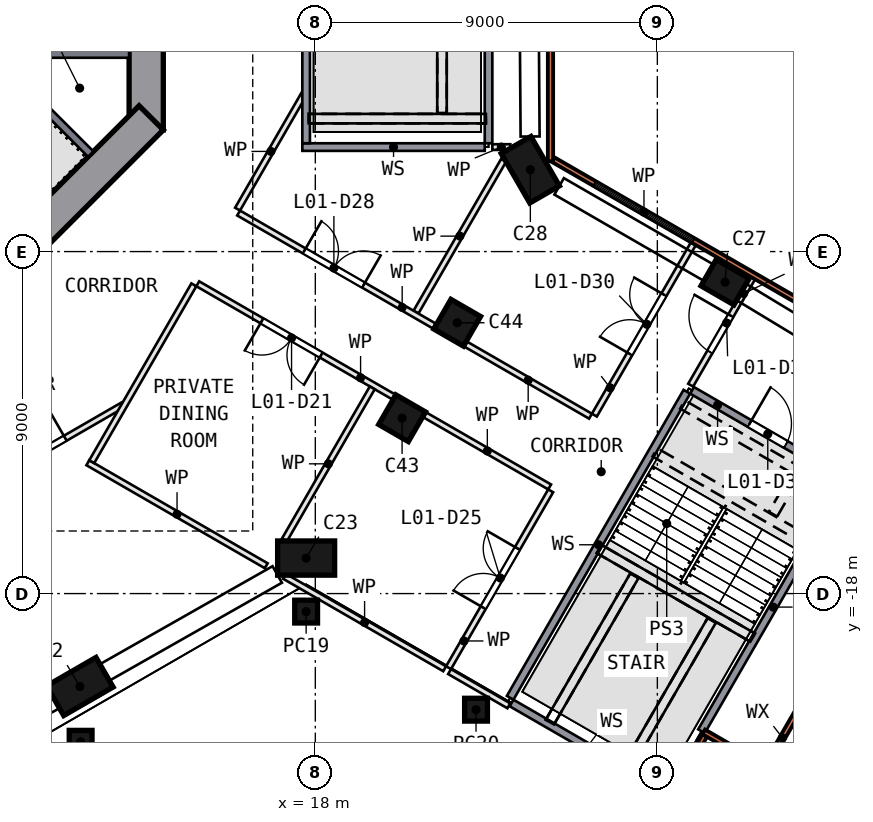
"""IFC4 building model, lengths in metres.
Left out: names, types, materials, properties, quantities, classifications, styles, units other than length and angle.
Written with IfcOpenShell. Run it as: python <this file> out.ifc"""

import sys

from ifc_helpers import new_model, si_unit, direction, frame, frame_2d, origin, origin_2d, place, context, subcontext, project, spatial, polyline, rectangle, outline, extrude, element, fill, save


model = new_model("IFC4")
c1 = context("Model", 3, precision=1e-05, world=origin(), true_north=direction((0.0, 1.0)))
c2 = subcontext(c1, "Body", "Model", "MODEL_VIEW")
j1 = project(units=[si_unit("LENGTHUNIT", "METRE"), si_unit("PLANEANGLEUNIT", "RADIAN")], contexts=[c1])
p1 = place(None, origin())
s1 = spatial("IfcSite", under=j1, at=p1, CompositionType="ELEMENT")
p2 = place(p1, origin())
s2 = spatial("IfcBuilding", under=s1, at=p2, CompositionType="ELEMENT")
p3 = place(p2, frame((0.0, 0.0, 8.0)))
s3 = spatial("IfcBuildingStorey", under=s2, at=p3, CompositionType="ELEMENT", Elevation=8.0)
for number, where, z_axis, x_axis in (
    (1, (11.804, -20.445, 0.0), (0.0, 0.0, 1.0), (0.866, 0.5, 0.0)),
    (2, (17.758, -17.065, 0.0), (0.0, 0.0, 1.0), (-1.0, 0.0, 0.0)),
):
    element("IfcColumn", number, at=place(p3, frame(where, z_axis=z_axis, x_axis=x_axis)), inside=s3, PredefinedType="COLUMN", context=c2, shape_type="SweptSolid", body=[
        extrude(rectangle(XDim=1.5, YDim=0.9, at=origin_2d()), origin(), (0.0, 0.0, 1.0), 5.55),
    ])
p4 = place(p3, frame((28.783, -9.805, 0.0), z_axis=(0.0, 0.0, 1.0), x_axis=(-0.866025404, 0.5, 0.0)))
e3 = element("IfcColumn", 3, at=p4, inside=s3, PredefinedType="COLUMN", context=c2, shape_type="SweptSolid", body=[
    extrude(rectangle(XDim=1.0, YDim=0.8, at=origin_2d()), origin(), (0.0, 0.0, 1.0), 5.55),
])
p5 = place(p3, frame((23.658, -6.846, 0.0), z_axis=(0.0, 0.0, 1.0), x_axis=(0.5, -0.866025404, 0.0)))
e4 = element("IfcColumn", 4, at=p5, inside=s3, PredefinedType="COLUMN", context=c2, shape_type="SweptSolid", body=[
    extrude(rectangle(XDim=1.5, YDim=0.9, at=origin_2d()), origin(), (0.0, 0.0, 1.0), 5.55),
])
for number, where, z_axis, x_axis in (
    (5, (20.283, -13.385, 0.0), (0.0, 0.0, 1.0), (0.866, -0.5, 0.0)),
    (6, (21.733, -10.873, 0.0), (0.0, 0.0, 1.0), (0.866, -0.5, 0.0)),
):
    element("IfcColumn", number, at=place(p3, frame(where, z_axis=z_axis, x_axis=x_axis)), inside=s3, PredefinedType="COLUMN", context=c2, shape_type="SweptSolid", body=[
        extrude(rectangle(XDim=0.9, YDim=0.9, at=origin_2d()), origin(), (0.0, 0.0, 1.0), 5.55),
    ])
p6 = place(p3, frame((13.55, -5.799, 0.0), z_axis=(0.0, 0.0, 1.0), x_axis=(0.0, 1.0, 0.0)))
e7 = element("IfcWall", 7, at=p6, inside=s3, PredefinedType="SHEAR", context=c2, shape_type="SweptSolid", body=[
    extrude(rectangle(XDim=11.598, YDim=0.9, at=frame_2d((5.799, 0.0))), origin(), (0.0, 0.0, 1.0), 6.0),
])
p7 = place(p6, frame((4.899, 0.0, 0.0)))
e8 = element("IfcOpeningElement", 8, at=p7, cuts=e7, PredefinedType="OPENING", context=c2, shape_type="SweptSolid", body=[
    extrude(rectangle(XDim=1.8, YDim=2.1, at=frame_2d((0.9, 1.05))), frame((0.0, 0.46, 0.0), z_axis=(0.0, -1.0, 0.0), x_axis=(1.0, 0.0, 0.0)), (0.0, 0.0, 1.0), 0.92),
])
p8 = place(p3, frame((5.481, -13.682, 0.0), z_axis=(0.0, 0.0, 1.0), x_axis=(0.707106781, 0.707106781, 0.0)))
e9 = element("IfcWall", 9, at=p8, inside=s3, PredefinedType="SHEAR", context=c2, shape_type="SweptSolid", body=[
    extrude(rectangle(XDim=11.598, YDim=0.9, at=frame_2d((5.799, 0.0))), origin(), (0.0, 0.0, 1.0), 6.0),
])
p9 = place(p8, frame((2.099, 0.0, 0.0)))
e10 = element("IfcOpeningElement", 10, at=p9, cuts=e9, PredefinedType="OPENING", context=c2, shape_type="SweptSolid", body=[
    extrude(rectangle(XDim=1.2, YDim=2.1, at=frame_2d((0.6, 1.05))), frame((0.0, 0.46, 0.0), z_axis=(0.0, -1.0, 0.0), x_axis=(1.0, 0.0, 0.0)), (0.0, 0.0, 1.0), 0.92),
])
for number, where, z_axis, x_axis in (
    (11, (11.825, -21.9, 0.0), (0.0, 0.0, 1.0), (0.0, -1.0, 0.0)),
    (12, (17.758, -18.474, 0.0), (0.0, 0.0, 1.0), (0.0, -1.0, 0.0)),
    (13, (22.229, -21.055, 0.0), (0.0, 0.0, 1.0), (0.0, -1.0, 0.0)),
):
    element("IfcColumn", number, at=place(p3, frame(where, z_axis=z_axis, x_axis=x_axis)), inside=s3, PredefinedType="COLUMN", context=c2, shape_type="SweptSolid", body=[
        extrude(rectangle(XDim=0.6, YDim=0.6, at=origin_2d()), origin(), (0.0, 0.0, 1.0), 6.0),
    ])
p10 = place(p3, frame((27.051, -23.807, 0.0), z_axis=(0.0, 0.0, 1.0), x_axis=(0.499969813, 0.866042832, 0.0)))
e14 = element("IfcWall", 14, at=p10, inside=s3, PredefinedType="SOLIDWALL", context=c2, shape_type="SweptSolid", body=[
    extrude(rectangle(XDim=2.392, YDim=0.14, at=frame_2d((1.196, 0.0))), origin(), (0.0, 0.0, 1.0), 5.55),
])
p11 = place(p3, frame((28.221, -21.64, 0.0), z_axis=(0.0, 0.0, 1.0), x_axis=(0.866011627, -0.500023862, 0.0)))
e15 = element("IfcWall", 15, at=p11, inside=s3, PredefinedType="SOLIDWALL", context=c2, shape_type="SweptSolid", body=[
    extrude(rectangle(XDim=1.94, YDim=0.14, at=frame_2d((0.97, 0.0))), origin(), (0.0, 0.0, 1.0), 5.55),
])
p12 = place(p3, frame((29.875, -22.514, 0.0), z_axis=(0.0, 0.0, 1.0), x_axis=(0.499998264, 0.866026406, 0.0)))
e16 = element("IfcWall", 16, at=p12, inside=s3, PredefinedType="SOLIDWALL", context=c2, shape_type="SweptSolid", body=[
    extrude(rectangle(XDim=1.66, YDim=0.14, at=frame_2d((0.83, 0.0))), origin(), (0.0, 0.0, 1.0), 5.55),
])
p13 = place(p3, frame((33.751, -12.062, 0.0), z_axis=(0.0, 0.0, 1.0), x_axis=(-0.86602647, 0.499998154, 0.0)))
e17 = element("IfcWall", 17, at=p13, inside=s3, PredefinedType="SOLIDWALL", context=c2, shape_type="SweptSolid", body=[
    extrude(rectangle(XDim=10.961, YDim=0.14, at=frame_2d((5.481, 0.0))), origin(), (0.0, 0.0, 1.0), 5.55),
])
p14 = place(p13, frame((6.702, 0.0, 0.9)))
e18 = element("IfcOpeningElement", 18, at=p14, cuts=e17, PredefinedType="OPENING", context=c2, shape_type="SweptSolid", body=[
    extrude(rectangle(XDim=3.0, YDim=3.6, at=frame_2d((1.5, 1.8))), frame((0.0, 0.08, 0.0), z_axis=(0.0, -1.0, 0.0), x_axis=(1.0, 0.0, 0.0)), (0.0, 0.0, 1.0), 0.16),
])
p15 = place(p3, frame((24.188, -6.621, 0.0), z_axis=(0.0, 0.0, 1.0), x_axis=(0.0, 1.0, 0.0)))
e19 = element("IfcWall", 19, at=p15, inside=s3, PredefinedType="SOLIDWALL", context=c2, shape_type="SweptSolid", body=[
    extrude(rectangle(XDim=13.242, YDim=0.14, at=frame_2d((6.621, 0.0))), origin(), (0.0, 0.0, 1.0), 5.55),
])
p16 = place(p3, origin())
e20 = element("IfcWall", 20, at=p16, inside=s3, PredefinedType="SOLIDWALL", context=c2, shape_type="SweptSolid", body=[
    extrude(outline(polyline([(13.1, -3.9), (10.9, -3.9), (10.9, -3.7), (12.9, -3.7), (12.9, -1.4), (10.9, -1.4), (10.9, -1.2), (13.1, -1.2), (13.1, -3.9)])), origin(), (0.0, 0.0, 1.0), 5.55),
])
p17 = place(p3, frame((9.334, -3.677, 0.0), z_axis=(0.0, 0.0, 1.0), x_axis=(0.707106781, -0.707106781, 0.0)))
e21 = element("IfcWall", 21, at=p17, inside=s3, PredefinedType="SOLIDWALL", context=c2, shape_type="SweptSolid", body=[
    extrude(rectangle(XDim=3.9, YDim=0.2, at=frame_2d((1.95, 0.0))), origin(), (0.0, 0.0, 1.0), 5.55),
])
p18 = place(p3, frame((12.014, -14.557, 0.0), z_axis=(0.0, 0.0, 1.0), x_axis=(0.866014594, -0.500018723, 0.0)))
e22 = element("IfcWall", 22, at=p18, inside=s3, PredefinedType="PARTITIONING", context=c2, shape_type="SweptSolid", body=[
    extrude(rectangle(XDim=5.421, YDim=0.15, at=frame_2d((2.71, 0.0))), origin(), (0.0, 0.0, 1.0), 5.55),
])
p19 = place(p3, frame((4.823, -17.721, 0.0), z_axis=(0.0, 0.0, 1.0), x_axis=(0.866037142, 0.499979668, 0.0)))
e23 = element("IfcWall", 23, at=p19, inside=s3, PredefinedType="PARTITIONING", context=c2, shape_type="SweptSolid", body=[
    extrude(rectangle(XDim=9.367, YDim=0.15, at=frame_2d((4.683, 0.0))), origin(), (0.0, 0.0, 1.0), 5.55),
])
p20 = place(p19, frame((5.817, 0.0, 0.0)))
e24 = element("IfcOpeningElement", 24, at=p20, cuts=e23, PredefinedType="OPENING", context=c2, shape_type="SweptSolid", body=[
    extrude(rectangle(XDim=1.8, YDim=2.1, at=frame_2d((0.9, 1.05))), frame((0.0, 0.085, 0.0), z_axis=(0.0, -1.0, 0.0), x_axis=(1.0, 0.0, 0.0)), (0.0, 0.0, 1.0), 0.17),
])
p21 = place(p3, frame((14.804, -9.875, 0.0), z_axis=(0.0, 0.0, 1.0), x_axis=(-0.4999885, -0.866032043, 0.0)))
e25 = element("IfcWall", 25, at=p21, inside=s3, PredefinedType="PARTITIONING", context=c2, shape_type="SweptSolid", body=[
    extrude(rectangle(XDim=5.375, YDim=0.15, at=frame_2d((2.688, 0.0))), origin(), (0.0, 0.0, 1.0), 5.55),
])
p22 = place(p3, frame((20.055, -12.82, 0.0), z_axis=(0.0, 0.0, 1.0), x_axis=(-0.866038559, 0.499977214, 0.0)))
e26 = element("IfcWall", 26, at=p22, inside=s3, PredefinedType="PARTITIONING", context=c2, shape_type="SweptSolid", body=[
    extrude(rectangle(XDim=5.945, YDim=0.15, at=frame_2d((2.973, 0.0))), origin(), (0.0, 0.0, 1.0), 5.55),
])
p23 = place(p22, frame((2.195, 0.0, 0.0)))
e27 = element("IfcOpeningElement", 27, at=p23, cuts=e26, PredefinedType="OPENING", context=c2, shape_type="SweptSolid", body=[
    extrude(rectangle(XDim=1.8, YDim=2.1, at=frame_2d((0.9, 1.05))), frame((0.0, 0.085, 0.0), z_axis=(0.0, -1.0, 0.0), x_axis=(1.0, 0.0, 0.0)), (0.0, 0.0, 1.0), 0.17),
])
p24 = place(p3, frame((20.886, -13.3, 0.0), z_axis=(0.0, 0.0, 1.0), x_axis=(0.866012734, -0.500021944, 0.0)))
e28 = element("IfcWall", 28, at=p24, inside=s3, PredefinedType="PARTITIONING", context=c2, shape_type="SweptSolid", body=[
    extrude(rectangle(XDim=3.787, YDim=0.15, at=frame_2d((1.894, 0.0))), origin(), (0.0, 0.0, 1.0), 5.55),
])
p25 = place(p3, frame((17.189, -16.585, 0.0), z_axis=(0.0, 0.0, 1.0), x_axis=(0.50002748, 0.866009538, 0.0)))
e29 = element("IfcWall", 29, at=p25, inside=s3, PredefinedType="PARTITIONING", context=c2, shape_type="SweptSolid", body=[
    extrude(rectangle(XDim=4.619, YDim=0.15, at=frame_2d((2.31, 0.0))), origin(), (0.0, 0.0, 1.0), 5.55),
])
p26 = place(p3, frame((17.19, -17.545, 0.0), z_axis=(0.0, 0.0, 1.0), x_axis=(0.866005103, -0.50003516, 0.0)))
e30 = element("IfcWall", 30, at=p26, inside=s3, PredefinedType="PARTITIONING", context=c2, shape_type="SweptSolid", body=[
    extrude(rectangle(XDim=4.866, YDim=0.15, at=frame_2d((2.433, 0.0))), origin(), (0.0, 0.0, 1.0), 5.55),
])
p27 = place(p3, frame((17.658, -6.25, 0.0), z_axis=(0.0, 0.0, 1.0), x_axis=(1.0, 0.0, 0.0)))
e31 = element("IfcWall", 31, at=p27, inside=s3, PredefinedType="SOLIDWALL", context=c2, shape_type="SweptSolid", body=[
    extrude(rectangle(XDim=4.8, YDim=0.2, at=frame_2d((2.4, 0.0))), origin(), (0.0, 0.0, 1.0), 5.55),
])
p28 = place(p3, frame((17.708, -4.845, 0.0), z_axis=(0.0, 0.0, 1.0), x_axis=(-0.499993523, -0.866029143, 0.0)))
e32 = element("IfcWall", 32, at=p28, inside=s3, PredefinedType="PARTITIONING", context=c2, shape_type="SweptSolid", body=[
    extrude(rectangle(XDim=3.508, YDim=0.15, at=frame_2d((1.754, 0.0))), origin(), (0.0, 0.0, 1.0), 5.55),
])
p29 = place(p3, frame((17.758, 3.15, 0.0), z_axis=(0.0, 0.0, 1.0), x_axis=(0.0, -1.0, 0.0)))
e33 = element("IfcWall", 33, at=p29, inside=s3, PredefinedType="SOLIDWALL", context=c2, shape_type="SweptSolid", body=[
    extrude(rectangle(XDim=9.3, YDim=0.2, at=frame_2d((4.65, 0.0))), origin(), (0.0, 0.0, 1.0), 5.55),
])
p30 = place(p3, frame((20.649, -10.594, 0.0), z_axis=(0.0, 0.0, 1.0), x_axis=(0.499987837, 0.866032426, 0.0)))
e34 = element("IfcWall", 34, at=p30, inside=s3, PredefinedType="PARTITIONING", context=c2, shape_type="SweptSolid", body=[
    extrude(rectangle(XDim=4.619, YDim=0.15, at=frame_2d((2.309, 0.0))), origin(), (0.0, 0.0, 1.0), 5.55),
])
p31 = place(p3, frame((21.533, -20.053, 0.0), z_axis=(0.0, 0.0, 1.0), x_axis=(0.865989076, -0.500062917, 0.0)))
e35 = element("IfcWall", 35, at=p31, inside=s3, PredefinedType="PARTITIONING", context=c2, shape_type="SweptSolid", body=[
    extrude(rectangle(XDim=1.8, YDim=0.15, at=frame_2d((0.9, 0.0))), origin(), (0.0, 0.0, 1.0), 5.55),
])
p32 = place(p3, frame((22.558, -6.15, 0.0), z_axis=(0.0, 0.0, 1.0), x_axis=(0.0, 1.0, 0.0)))
e36 = element("IfcWall", 36, at=p32, inside=s3, PredefinedType="SOLIDWALL", context=c2, shape_type="SweptSolid", body=[
    extrude(rectangle(XDim=9.5, YDim=0.2, at=frame_2d((4.75, 0.0))), origin(), (0.0, 0.0, 1.0), 5.55),
])
p33 = place(p3, frame((22.658, -6.25, 0.0), z_axis=(0.0, 0.0, 1.0), x_axis=(1.0, 0.0, 0.0)))
e37 = element("IfcWall", 37, at=p33, inside=s3, PredefinedType="PARTITIONING", context=c2, shape_type="SweptSolid", body=[
    extrude(rectangle(XDim=0.473, YDim=0.15, at=frame_2d((0.237, 0.0))), origin(), (0.0, 0.0, 1.0), 5.55),
])
p34 = place(p3, frame((23.164, -20.879, 0.0), z_axis=(0.0, 0.0, 1.0), x_axis=(0.866030039, -0.499991972, 0.0)))
e38 = element("IfcWall", 38, at=p34, inside=s3, PredefinedType="SOLIDWALL", context=c2, shape_type="SweptSolid", body=[
    extrude(rectangle(XDim=4.6, YDim=0.2, at=frame_2d((2.3, 0.0))), origin(), (0.0, 0.0, 1.0), 5.55),
])
p35 = place(p3, frame((21.506, -19.951, 0.0), z_axis=(0.0, 0.0, 1.0), x_axis=(0.500008168, 0.866020688, 0.0)))
e39 = element("IfcWall", 39, at=p35, inside=s3, PredefinedType="PARTITIONING", context=c2, shape_type="SweptSolid", body=[
    extrude(rectangle(XDim=5.375, YDim=0.15, at=frame_2d((2.688, 0.0))), origin(), (0.0, 0.0, 1.0), 5.55),
])
p36 = place(p35, frame((1.825, 0.0, 0.0)))
e40 = element("IfcOpeningElement", 40, at=p36, cuts=e39, PredefinedType="OPENING", context=c2, shape_type="SweptSolid", body=[
    extrude(rectangle(XDim=1.8, YDim=2.1, at=frame_2d((0.9, 1.05))), frame((0.0, 0.085, 0.0), z_axis=(0.0, -1.0, 0.0), x_axis=(1.0, 0.0, 0.0)), (0.0, 0.0, 1.0), 0.17),
])
p37 = place(p3, frame((15.982, -7.986, 0.0), z_axis=(0.0, 0.0, 1.0), x_axis=(0.86601051, -0.500025795, 0.0)))
e41 = element("IfcWall", 41, at=p37, inside=s3, PredefinedType="PARTITIONING", context=c2, shape_type="SweptSolid", body=[
    extrude(rectangle(XDim=5.945, YDim=0.15, at=frame_2d((2.973, 0.0))), origin(), (0.0, 0.0, 1.0), 5.55),
])
p38 = place(p37, frame((1.995, 0.0, 0.0)))
e42 = element("IfcOpeningElement", 42, at=p38, cuts=e41, PredefinedType="OPENING", context=c2, shape_type="SweptSolid", body=[
    extrude(rectangle(XDim=1.8, YDim=2.1, at=frame_2d((0.9, 1.05))), frame((0.0, 0.085, 0.0), z_axis=(0.0, -1.0, 0.0), x_axis=(1.0, 0.0, 0.0)), (0.0, 0.0, 1.0), 0.17),
])
p39 = place(p3, frame((25.241, -13.332, 0.0), z_axis=(0.0, 0.0, 1.0), x_axis=(-0.866040651, 0.499973591, 0.0)))
e43 = element("IfcWall", 43, at=p39, inside=s3, PredefinedType="PARTITIONING", context=c2, shape_type="SweptSolid", body=[
    extrude(rectangle(XDim=3.787, YDim=0.15, at=frame_2d((1.894, 0.0))), origin(), (0.0, 0.0, 1.0), 5.55),
])
p40 = place(p3, frame((28.162, -21.623, 0.0), z_axis=(0.0, 0.0, 1.0), x_axis=(0.499981072, 0.866036332, 0.0)))
e44 = element("IfcWall", 44, at=p40, inside=s3, PredefinedType="SOLIDWALL", context=c2, shape_type="SweptSolid", body=[
    extrude(rectangle(XDim=7.545, YDim=0.2, at=frame_2d((3.772, 0.0))), origin(), (0.0, 0.0, 1.0), 5.55),
])
p41 = place(p3, frame((27.777, -12.688, 0.0), z_axis=(0.0, 0.0, 1.0), x_axis=(-0.500004225, -0.866022964, 0.0)))
e45 = element("IfcWall", 45, at=p41, inside=s3, PredefinedType="SOLIDWALL", context=c2, shape_type="SweptSolid", body=[
    extrude(rectangle(XDim=9.3, YDim=0.2, at=frame_2d((4.65, 0.0))), origin(), (0.0, 0.0, 1.0), 5.55),
])
p42 = place(p3, frame((25.343, -13.304, 0.0), z_axis=(0.0, 0.0, 1.0), x_axis=(0.499979347, 0.866037328, 0.0)))
e46 = element("IfcWall", 46, at=p42, inside=s3, PredefinedType="PARTITIONING", context=c2, shape_type="SweptSolid", body=[
    extrude(rectangle(XDim=5.21, YDim=0.15, at=frame_2d((2.605, 0.0))), origin(), (0.0, 0.0, 1.0), 5.55),
])
p43 = place(p42, frame((1.86, 0.0, 0.0)))
e47 = element("IfcOpeningElement", 47, at=p43, cuts=e46, PredefinedType="OPENING", context=c2, shape_type="SweptSolid", body=[
    extrude(rectangle(XDim=1.8, YDim=2.1, at=frame_2d((0.9, 1.05))), frame((0.0, 0.085, 0.0), z_axis=(0.0, -1.0, 0.0), x_axis=(1.0, 0.0, 0.0)), (0.0, 0.0, 1.0), 0.17),
])
p44 = place(p3, frame((27.877, -12.515, 0.0), z_axis=(0.0, 0.0, 1.0), x_axis=(0.499973122, 0.866040921, 0.0)))
e48 = element("IfcWall", 48, at=p44, inside=s3, PredefinedType="PARTITIONING", context=c2, shape_type="SweptSolid", body=[
    extrude(rectangle(XDim=3.26, YDim=0.15, at=frame_2d((1.63, 0.0))), origin(), (0.0, 0.0, 1.0), 5.55),
])
p45 = place(p44, frame((1.01, 0.0, 0.0)))
e49 = element("IfcOpeningElement", 49, at=p45, cuts=e48, PredefinedType="OPENING", context=c2, shape_type="SweptSolid", body=[
    extrude(rectangle(XDim=1.1, YDim=2.1, at=frame_2d((0.55, 1.05))), frame((0.0, 0.085, 0.0), z_axis=(0.0, -1.0, 0.0), x_axis=(1.0, 0.0, 0.0)), (0.0, 0.0, 1.0), 0.17),
])
p46 = place(p3, frame((27.914, -12.652, 0.0), z_axis=(0.0, 0.0, 1.0), x_axis=(0.86601677, -0.500014953, 0.0)))
e50 = element("IfcWall", 50, at=p46, inside=s3, PredefinedType="SOLIDWALL", context=c2, shape_type="SweptSolid", body=[
    extrude(rectangle(XDim=4.6, YDim=0.2, at=frame_2d((2.3, 0.0))), origin(), (0.0, 0.0, 1.0), 5.55),
])
p47 = place(p46, frame((1.75, 0.0, 0.0)))
e51 = element("IfcOpeningElement", 51, at=p47, cuts=e50, PredefinedType="OPENING", context=c2, shape_type="SweptSolid", body=[
    extrude(rectangle(XDim=1.1, YDim=2.1, at=frame_2d((0.55, 1.05))), frame((0.0, 0.11, 0.0), z_axis=(0.0, -1.0, 0.0), x_axis=(1.0, 0.0, 0.0)), (0.0, 0.0, 1.0), 0.22),
])
p48 = place(p14, origin())
e52 = element("IfcWindow", 52, at=p48, inside=s3, PartitioningType="SINGLE_PANEL", PredefinedType="WINDOW", context=c2, shape_type="SweptSolid", body=[
    extrude(rectangle(XDim=3.0, YDim=3.6, at=frame_2d((1.5, 1.8))), frame((0.0, 0.03, 0.0), z_axis=(0.0, -1.0, 0.0), x_axis=(1.0, 0.0, 0.0)), (0.0, 0.0, 1.0), 0.06),
])
fill(e18, e52)
p49 = place(p20, origin())
e53 = element("IfcDoor", 53, at=p49, inside=s3, OperationType="DOUBLE_DOOR_SINGLE_SWING", PredefinedType="DOOR", context=c2, shape_type="SweptSolid", body=[
    extrude(rectangle(XDim=1.8, YDim=2.1, at=frame_2d((0.9, 1.05))), frame((0.0, 0.025, 0.0), z_axis=(0.0, -1.0, 0.0), x_axis=(1.0, 0.0, 0.0)), (0.0, 0.0, 1.0), 0.05),
])
fill(e24, e53)
p50 = place(p23, origin())
e54 = element("IfcDoor", 54, at=p50, inside=s3, OperationType="DOUBLE_DOOR_SINGLE_SWING", PredefinedType="DOOR", context=c2, shape_type="SweptSolid", body=[
    extrude(rectangle(XDim=1.8, YDim=2.1, at=frame_2d((0.9, 1.05))), frame((0.0, 0.025, 0.0), z_axis=(0.0, -1.0, 0.0), x_axis=(1.0, 0.0, 0.0)), (0.0, 0.0, 1.0), 0.05),
])
fill(e27, e54)
p51 = place(p36, origin())
e55 = element("IfcDoor", 55, at=p51, inside=s3, OperationType="DOUBLE_DOOR_SINGLE_SWING", PredefinedType="DOOR", context=c2, shape_type="SweptSolid", body=[
    extrude(rectangle(XDim=1.8, YDim=2.1, at=frame_2d((0.9, 1.05))), frame((0.0, 0.025, 0.0), z_axis=(0.0, -1.0, 0.0), x_axis=(1.0, 0.0, 0.0)), (0.0, 0.0, 1.0), 0.05),
])
fill(e40, e55)
p52 = place(p38, origin())
e56 = element("IfcDoor", 56, at=p52, inside=s3, OperationType="DOUBLE_DOOR_SINGLE_SWING", PredefinedType="DOOR", context=c2, shape_type="SweptSolid", body=[
    extrude(rectangle(XDim=1.8, YDim=2.1, at=frame_2d((0.9, 1.05))), frame((0.0, 0.025, 0.0), z_axis=(0.0, -1.0, 0.0), x_axis=(1.0, 0.0, 0.0)), (0.0, 0.0, 1.0), 0.05),
])
fill(e42, e56)
p53 = place(p43, origin())
e57 = element("IfcDoor", 57, at=p53, inside=s3, OperationType="DOUBLE_DOOR_SINGLE_SWING", PredefinedType="DOOR", context=c2, shape_type="SweptSolid", body=[
    extrude(rectangle(XDim=1.8, YDim=2.1, at=frame_2d((0.9, 1.05))), frame((0.0, 0.025, 0.0), z_axis=(0.0, -1.0, 0.0), x_axis=(1.0, 0.0, 0.0)), (0.0, 0.0, 1.0), 0.05),
])
fill(e47, e57)
p54 = place(p45, origin())
e58 = element("IfcDoor", 58, at=p54, inside=s3, OperationType="SINGLE_SWING_RIGHT", PredefinedType="DOOR", context=c2, shape_type="SweptSolid", body=[
    extrude(rectangle(XDim=1.1, YDim=2.1, at=frame_2d((0.55, 1.05))), frame((0.0, 0.025, 0.0), z_axis=(0.0, -1.0, 0.0), x_axis=(1.0, 0.0, 0.0)), (0.0, 0.0, 1.0), 0.05),
])
fill(e49, e58)
p55 = place(p47, origin())
e59 = element("IfcDoor", 59, at=p55, inside=s3, OperationType="SINGLE_SWING_LEFT", PredefinedType="DOOR", context=c2, shape_type="SweptSolid", body=[
    extrude(rectangle(XDim=1.1, YDim=2.1, at=frame_2d((0.55, 1.05))), frame((0.0, 0.025, 0.0), z_axis=(0.0, -1.0, 0.0), x_axis=(1.0, 0.0, 0.0)), (0.0, 0.0, 1.0), 0.05),
])
fill(e51, e59)
save(model, sys.argv[1])
